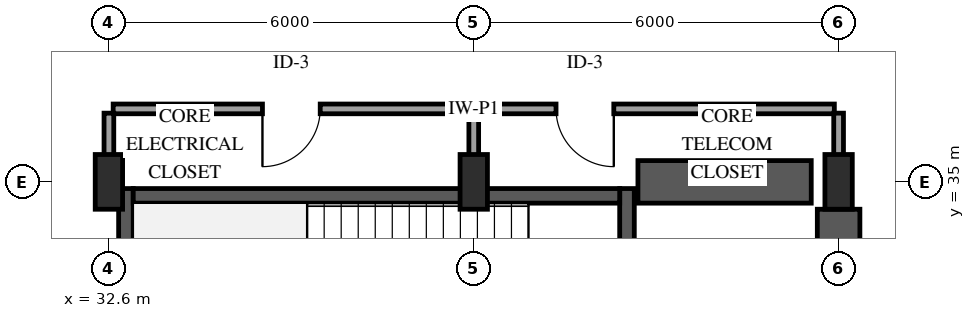
"""IFC4 building model, lengths in metres.
Left out: names, types, materials, properties, quantities, classifications, styles, units other than length and angle.
Written with IfcOpenShell. Run it as: python <this file> out.ifc"""

import sys

from ifc_helpers import new_model, si_unit, direction, frame, frame_2d, origin, origin_2d, place, context, subcontext, project, spatial, rectangle, extrude, element, fill, save


model = new_model("IFC4")
c1 = context("Model", 3, precision=1e-05, world=origin(), true_north=direction((0.0, 1.0)))
c2 = subcontext(c1, "Body", "Model", "MODEL_VIEW")
j1 = project(units=[si_unit("LENGTHUNIT", "METRE"), si_unit("PLANEANGLEUNIT", "RADIAN")], contexts=[c1])
p1 = place(None, origin())
s1 = spatial("IfcSite", under=j1, at=p1, CompositionType="ELEMENT")
p2 = place(p1, origin())
s2 = spatial("IfcBuilding", under=s1, at=p2, CompositionType="ELEMENT")
p3 = place(p2, frame((0.0, 0.0, -10.2)))
s3 = spatial("IfcBuildingStorey", under=s2, at=p3, CompositionType="ELEMENT", Elevation=-10.2)
p4 = place(p3, frame((32.88, 31.26, -0.4), z_axis=(0.0, 0.0, 1.0), x_axis=(0.0, 1.0, 0.0)))
e1 = element("IfcWall", 1, at=p4, inside=s3, PredefinedType="SHEAR", context=c2, shape_type="SweptSolid", body=[
    extrude(rectangle(XDim=3.63, YDim=0.24, at=frame_2d((1.815, 0.0))), origin(), (0.0, 0.0, 1.0), 5.2),
])
p5 = place(p3, frame((41.12, 31.26, -0.4), z_axis=(0.0, 0.0, 1.0), x_axis=(0.0, 1.0, 0.0)))
e2 = element("IfcWall", 2, at=p5, inside=s3, PredefinedType="SHEAR", context=c2, shape_type="SweptSolid", body=[
    extrude(rectangle(XDim=3.63, YDim=0.24, at=frame_2d((1.815, 0.0))), origin(), (0.0, 0.0, 1.0), 5.2),
])
p6 = place(p5, frame((1.255, 0.0, 0.4)))
e3 = element("IfcOpeningElement", 3, at=p6, cuts=e2, PredefinedType="OPENING", context=c2, shape_type="SweptSolid", body=[
    extrude(rectangle(XDim=1.12, YDim=2.15, at=frame_2d((0.56, 1.075))), frame((0.0, 0.13, 0.0), z_axis=(0.0, -1.0, 0.0), x_axis=(1.0, 0.0, 0.0)), (0.0, 0.0, 1.0), 0.26),
])
p7 = place(p3, frame((33.0, 34.77, -0.4), z_axis=(0.0, 0.0, 1.0), x_axis=(1.0, 0.0, 0.0)))
e4 = element("IfcWall", 4, at=p7, inside=s3, PredefinedType="SHEAR", context=c2, shape_type="SweptSolid", body=[
    extrude(rectangle(XDim=8.0, YDim=0.24, at=frame_2d((4.0, 0.0))), origin(), (0.0, 0.0, 1.0), 5.2),
])
p8 = place(p3, frame((41.3, 35.0, -0.4), z_axis=(0.0, 0.0, 1.0), x_axis=(1.0, 0.0, 0.0)))
e5 = element("IfcWall", 5, at=p8, inside=s3, PredefinedType="SHEAR", context=c2, shape_type="SweptSolid", body=[
    extrude(rectangle(XDim=2.85, YDim=0.7, at=frame_2d((1.425, 0.0))), origin(), (0.0, 0.0, 1.0), 5.2),
])
p9 = place(p3, frame((44.6, 29.8, -0.4), z_axis=(0.0, 0.0, 1.0), x_axis=(0.0, 1.0, 0.0)))
e6 = element("IfcWall", 6, at=p9, inside=s3, PredefinedType="SHEAR", context=c2, shape_type="SweptSolid", body=[
    extrude(rectangle(XDim=4.75, YDim=0.7, at=frame_2d((2.375, 0.0))), origin(), (0.0, 0.0, 1.0), 5.2),
])
for number, where, z_axis, x_axis in (
    (7, (32.6, 35.0, -0.4), (0.0, 0.0, 1.0), (1.0, 0.0, 0.0)),
    (8, (38.6, 35.0, -0.4), (0.0, 0.0, 1.0), (1.0, 0.0, 0.0)),
    (9, (44.6, 35.0, -0.4), (0.0, 0.0, 1.0), (1.0, 0.0, 0.0)),
):
    element("IfcColumn", number, at=place(p3, frame(where, z_axis=z_axis, x_axis=x_axis)), inside=s3, PredefinedType="PILASTER", context=c2, shape_type="SweptSolid", body=[
        extrude(rectangle(XDim=0.45, YDim=0.9, at=origin_2d()), origin(), (0.0, 0.0, 1.0), 5.2),
    ])
p10 = place(p3, frame((38.53, 36.2, 0.0), z_axis=(0.0, 0.0, 1.0), x_axis=(-1.0, 0.0, 0.0)))
e10 = element("IfcWall", 10, at=p10, inside=s3, PredefinedType="PARTITIONING", context=c2, shape_type="SweptSolid", body=[
    extrude(rectangle(XDim=5.86, YDim=0.16, at=frame_2d((2.93, 0.0))), origin(), (0.0, 0.0, 1.0), 4.44),
])
p11 = place(p10, frame((2.455, 0.0, 0.0)))
e11 = element("IfcOpeningElement", 11, at=p11, cuts=e10, PredefinedType="OPENING", context=c2, shape_type="SweptSolid", body=[
    extrude(rectangle(XDim=0.95, YDim=2.15, at=frame_2d((0.475, 1.075))), frame((0.0, 0.09, 0.0), z_axis=(0.0, -1.0, 0.0), x_axis=(1.0, 0.0, 0.0)), (0.0, 0.0, 1.0), 0.18),
])
p12 = place(p3, frame((44.53, 36.2, 0.0), z_axis=(0.0, 0.0, 1.0), x_axis=(-1.0, 0.0, 0.0)))
e12 = element("IfcWall", 12, at=p12, inside=s3, PredefinedType="PARTITIONING", context=c2, shape_type="SweptSolid", body=[
    extrude(rectangle(XDim=5.86, YDim=0.16, at=frame_2d((2.93, 0.0))), origin(), (0.0, 0.0, 1.0), 4.44),
])
p13 = place(p12, frame((3.627, 0.0, 0.0)))
e13 = element("IfcOpeningElement", 13, at=p13, cuts=e12, PredefinedType="OPENING", context=c2, shape_type="SweptSolid", body=[
    extrude(rectangle(XDim=0.95, YDim=2.15, at=frame_2d((0.475, 1.075))), frame((0.0, 0.09, 0.0), z_axis=(0.0, -1.0, 0.0), x_axis=(1.0, 0.0, 0.0)), (0.0, 0.0, 1.0), 0.18),
])
for number, where, z_axis, x_axis in (
    (14, (32.6, 36.13, 0.0), (0.0, 0.0, 1.0), (0.0, -1.0, 0.0)),
    (15, (44.6, 35.07, 0.0), (0.0, 0.0, 1.0), (0.0, 1.0, 0.0)),
):
    element("IfcWall", number, at=place(p3, frame(where, z_axis=z_axis, x_axis=x_axis)), inside=s3, PredefinedType="PARTITIONING", context=c2, shape_type="SweptSolid", body=[
        extrude(rectangle(XDim=1.06, YDim=0.16, at=frame_2d((0.53, 0.0))), origin(), (0.0, 0.0, 1.0), 3.562),
    ])
p14 = place(p3, frame((38.6, 36.13, 0.0), z_axis=(0.0, 0.0, 1.0), x_axis=(0.0, -1.0, 0.0)))
e16 = element("IfcWall", 16, at=p14, inside=s3, PredefinedType="PARTITIONING", context=c2, shape_type="SweptSolid", body=[
    extrude(rectangle(XDim=1.06, YDim=0.16, at=frame_2d((0.53, 0.0))), origin(), (0.0, 0.0, 1.0), 4.44),
])
p15 = place(p11, origin())
e17 = element("IfcDoor", 17, at=p15, inside=s3, OperationType="SINGLE_SWING_RIGHT", PredefinedType="DOOR", context=c2, shape_type="SweptSolid", body=[
    extrude(rectangle(XDim=0.95, YDim=2.15, at=frame_2d((0.475, 1.075))), frame((0.0, 0.025, 0.0), z_axis=(0.0, -1.0, 0.0), x_axis=(1.0, 0.0, 0.0)), (0.0, 0.0, 1.0), 0.05),
])
fill(e11, e17)
p16 = place(p13, origin())
e18 = element("IfcDoor", 18, at=p16, inside=s3, OperationType="SINGLE_SWING_LEFT", PredefinedType="DOOR", context=c2, shape_type="SweptSolid", body=[
    extrude(rectangle(XDim=0.95, YDim=2.15, at=frame_2d((0.475, 1.075))), frame((0.0, 0.025, 0.0), z_axis=(0.0, -1.0, 0.0), x_axis=(1.0, 0.0, 0.0)), (0.0, 0.0, 1.0), 0.05),
])
fill(e13, e18)
save(model, sys.argv[1])
